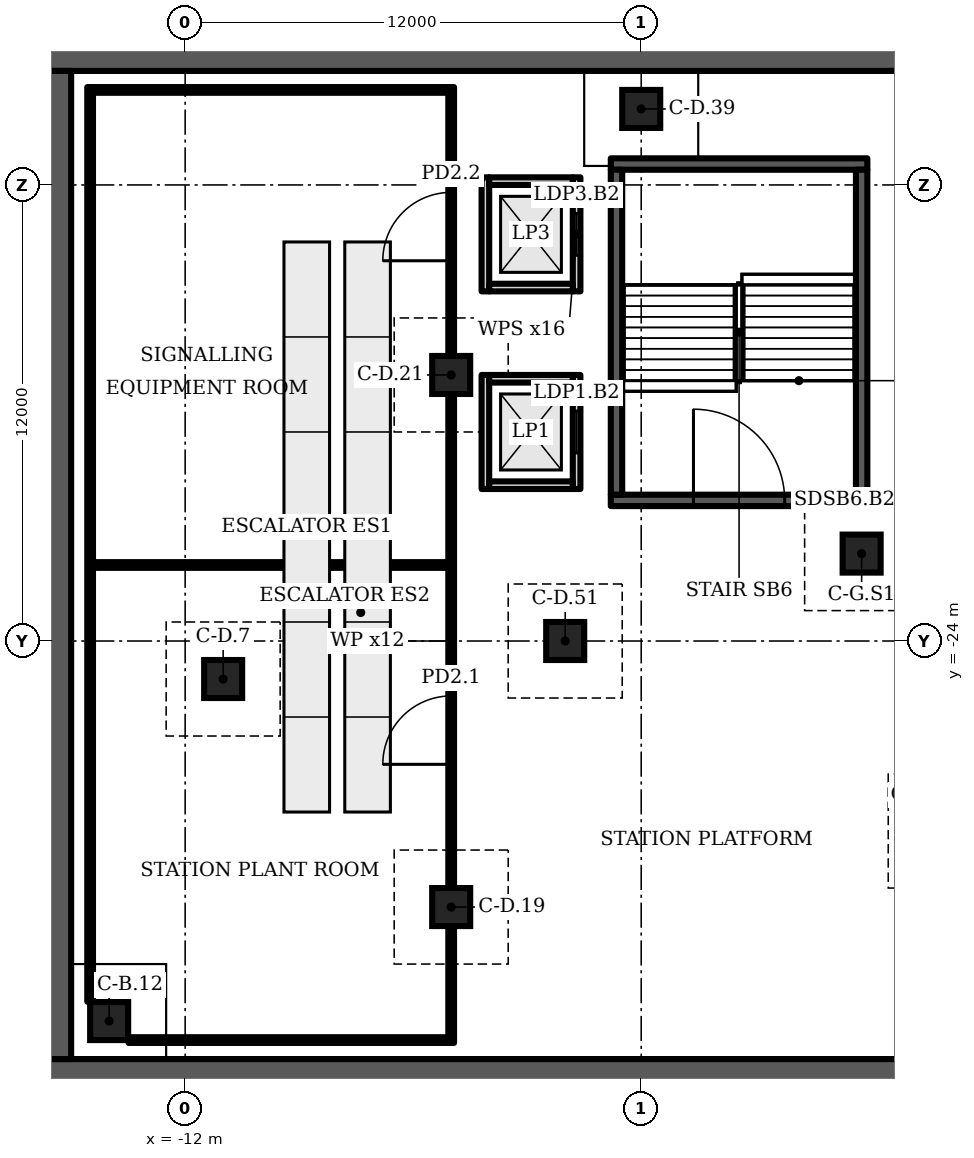
"""IFC4 building model, lengths in metres.
Left out: names, types, materials, properties, quantities, classifications, styles, units other than length and angle.
Written with IfcOpenShell. Run it as: python <this file> out.ifc"""

import sys

from ifc_helpers import new_model, si_unit, direction, frame, frame_2d, origin, origin_2d, place, context, subcontext, project, spatial, rectangle, extrude, element, fill, save


model = new_model("IFC4")
c1 = context("Model", 3, precision=1e-05, world=origin(), true_north=direction((0.0, 1.0)))
c2 = subcontext(c1, "Body", "Model", "MODEL_VIEW")
j1 = project(units=[si_unit("LENGTHUNIT", "METRE"), si_unit("PLANEANGLEUNIT", "RADIAN")], contexts=[c1])
p1 = place(None, origin())
s1 = spatial("IfcSite", under=j1, at=p1, CompositionType="ELEMENT")
p2 = place(p1, origin())
s2 = spatial("IfcBuilding", under=s1, at=p2, CompositionType="ELEMENT")
p3 = place(p2, frame((0.0, 0.0, -14.4)))
s3 = spatial("IfcBuildingStorey", under=s2, at=p3, CompositionType="ELEMENT", Elevation=-14.4)
for number, where, z_axis, x_axis in (
    (1, (-16.0, -35.5, -13.6), (0.0, 0.0, 1.0), (1.0, 0.0, 0.0)),
    (2, (-16.0, -8.5, -13.6), (0.0, 0.0, 1.0), (1.0, 0.0, 0.0)),
):
    element("IfcWall", number, at=place(p3, frame(where, z_axis=z_axis, x_axis=x_axis)), inside=s3, PredefinedType="SOLIDWALL", context=c2, shape_type="SweptSolid", body=[
        extrude(rectangle(XDim=128.0, YDim=1.0, at=frame_2d((64.0, 0.0))), origin(), (0.0, 0.0, 1.0), 20.8),
    ])
p4 = place(p3, frame((-15.5, -35.0, -13.6), z_axis=(0.0, 0.0, 1.0), x_axis=(0.0, 1.0, 0.0)))
e3 = element("IfcWall", 3, at=p4, inside=s3, PredefinedType="SOLIDWALL", context=c2, shape_type="SweptSolid", body=[
    extrude(rectangle(XDim=26.0, YDim=1.0, at=frame_2d((13.0, 0.0))), origin(), (0.0, 0.0, 1.0), 20.8),
])
for number, where, z_axis, x_axis in (
    (4, (5.8, -21.7, 0.0), (0.0, 0.0, 1.0), (1.0, 0.0, 0.0)),
    (5, (-11.0, -25.0, 0.0), (0.0, 0.0, 1.0), (1.0, 0.0, 0.0)),
    (6, (-5.0, -31.0, 0.0), (0.0, 0.0, 1.0), (1.0, 0.0, 0.0)),
    (7, (-5.0, -17.0, 0.0), (0.0, 0.0, 1.0), (1.0, 0.0, 0.0)),
    (8, (0.0, -10.0, 0.0), (0.0, 0.0, 1.0), (1.0, 0.0, 0.0)),
    (9, (-2.0, -24.0, 0.0), (0.0, 0.0, 1.0), (1.0, 0.0, 0.0)),
    (10, (-14.0, -34.0, 0.0), (0.0, 0.0, 1.0), (1.0, 0.0, 0.0)),
):
    element("IfcColumn", number, at=place(p3, frame(where, z_axis=z_axis, x_axis=x_axis)), inside=s3, PredefinedType="COLUMN", context=c2, shape_type="SweptSolid", body=[
        extrude(rectangle(XDim=1.0, YDim=1.0, at=origin_2d()), origin(), (0.0, 0.0, 1.0), 7.2),
    ])
p5 = place(p3, frame((-13.49, -34.5, 0.0), z_axis=(0.0, 0.0, 1.0), x_axis=(1.0, 0.0, 0.0)))
e11 = element("IfcWall", 11, at=p5, inside=s3, PredefinedType="PARTITIONING", context=c2, shape_type="SweptSolid", body=[
    extrude(rectangle(XDim=8.415, YDim=0.15, at=frame_2d((4.208, 0.0))), origin(), (0.0, 0.0, 1.0), 6.9),
])
p6 = place(p3, frame((-5.0, -34.575, 0.0), z_axis=(0.0, 0.0, 1.0), x_axis=(0.0, 1.0, 0.0)))
e12 = element("IfcWall", 12, at=p6, inside=s3, PredefinedType="PARTITIONING", context=c2, shape_type="SweptSolid", body=[
    extrude(rectangle(XDim=3.065, YDim=0.15, at=frame_2d((1.532, 0.0))), origin(), (0.0, 0.0, 1.0), 6.9),
])
p7 = place(p3, frame((-5.0, -30.49, 0.0), z_axis=(0.0, 0.0, 1.0), x_axis=(0.0, 1.0, 0.0)))
e13 = element("IfcWall", 13, at=p7, inside=s3, PredefinedType="PARTITIONING", context=c2, shape_type="SweptSolid", body=[
    extrude(rectangle(XDim=12.98, YDim=0.15, at=frame_2d((6.49, 0.0))), origin(), (0.0, 0.0, 1.0), 6.9),
])
p8 = place(p7, frame((3.245, 0.0, 0.0)))
e14 = element("IfcOpeningElement", 14, at=p8, cuts=e13, PredefinedType="OPENING", context=c2, shape_type="SweptSolid", body=[
    extrude(rectangle(XDim=1.8, YDim=2.1, at=frame_2d((0.9, 1.05))), frame((0.0, 0.085, 0.0), z_axis=(0.0, -1.0, 0.0), x_axis=(1.0, 0.0, 0.0)), (0.0, 0.0, 1.0), 0.17),
])
p9 = place(p3, frame((-5.0, -16.49, 0.0), z_axis=(0.0, 0.0, 1.0), x_axis=(0.0, 1.0, 0.0)))
e15 = element("IfcWall", 15, at=p9, inside=s3, PredefinedType="PARTITIONING", context=c2, shape_type="SweptSolid", body=[
    extrude(rectangle(XDim=7.065, YDim=0.15, at=frame_2d((3.532, 0.0))), origin(), (0.0, 0.0, 1.0), 6.9),
])
p10 = place(p9, frame((2.495, 0.0, 0.0)))
e16 = element("IfcOpeningElement", 16, at=p10, cuts=e15, PredefinedType="OPENING", context=c2, shape_type="SweptSolid", body=[
    extrude(rectangle(XDim=1.8, YDim=2.1, at=frame_2d((0.9, 1.05))), frame((0.0, 0.085, 0.0), z_axis=(0.0, -1.0, 0.0), x_axis=(1.0, 0.0, 0.0)), (0.0, 0.0, 1.0), 0.17),
])
p11 = place(p3, frame((-14.425, -22.0, 0.0), z_axis=(0.0, 0.0, 1.0), x_axis=(1.0, 0.0, 0.0)))
e17 = element("IfcWall", 17, at=p11, inside=s3, PredefinedType="PARTITIONING", context=c2, shape_type="SweptSolid", body=[
    extrude(rectangle(XDim=9.35, YDim=0.15, at=frame_2d((4.675, 0.0))), origin(), (0.0, 0.0, 1.0), 6.9),
])
p12 = place(p3, frame((-14.5, -33.49, 0.0), z_axis=(0.0, 0.0, 1.0), x_axis=(0.0, 1.0, 0.0)))
e18 = element("IfcWall", 18, at=p12, inside=s3, PredefinedType="PARTITIONING", context=c2, shape_type="SweptSolid", body=[
    extrude(rectangle(XDim=24.065, YDim=0.15, at=frame_2d((12.032, 0.0))), origin(), (0.0, 0.0, 1.0), 6.9),
])
p13 = place(p3, frame((-14.425, -9.5, 0.0), z_axis=(0.0, 0.0, 1.0), x_axis=(1.0, 0.0, 0.0)))
e19 = element("IfcWall", 19, at=p13, inside=s3, PredefinedType="PARTITIONING", context=c2, shape_type="SweptSolid", body=[
    extrude(rectangle(XDim=9.35, YDim=0.15, at=frame_2d((4.675, 0.0))), origin(), (0.0, 0.0, 1.0), 6.9),
])
p14 = place(p3, frame((-0.8, -20.3, 0.0), z_axis=(0.0, 0.0, 1.0), x_axis=(1.0, 0.0, 0.0)))
e20 = element("IfcWall", 20, at=p14, inside=s3, PredefinedType="SHEAR", context=c2, shape_type="SweptSolid", body=[
    extrude(rectangle(XDim=6.75, YDim=0.3, at=frame_2d((3.375, 0.0))), origin(), (0.0, 0.0, 1.0), 6.9),
])
p15 = place(p14, frame((2.175, 0.0, 0.0)))
e21 = element("IfcOpeningElement", 21, at=p15, cuts=e20, PredefinedType="OPENING", context=c2, shape_type="SweptSolid", body=[
    extrude(rectangle(XDim=2.4, YDim=2.1, at=frame_2d((1.2, 1.05))), frame((0.0, 0.16, 0.0), z_axis=(0.0, -1.0, 0.0), x_axis=(1.0, 0.0, 0.0)), (0.0, 0.0, 1.0), 0.32),
])
p16 = place(p3, frame((-0.8, -11.45, 0.0), z_axis=(0.0, 0.0, 1.0), x_axis=(1.0, 0.0, 0.0)))
e22 = element("IfcWall", 22, at=p16, inside=s3, PredefinedType="SHEAR", context=c2, shape_type="SweptSolid", body=[
    extrude(rectangle(XDim=6.75, YDim=0.3, at=frame_2d((3.375, 0.0))), origin(), (0.0, 0.0, 1.0), 6.9),
])
for number, where, z_axis, x_axis in (
    (23, (-0.65, -20.15, 0.0), (0.0, 0.0, 1.0), (0.0, 1.0, 0.0)),
    (24, (5.8, -20.15, 0.0), (0.0, 0.0, 1.0), (0.0, 1.0, 0.0)),
):
    element("IfcWall", number, at=place(p3, frame(where, z_axis=z_axis, x_axis=x_axis)), inside=s3, PredefinedType="SHEAR", context=c2, shape_type="SweptSolid", body=[
        extrude(rectangle(XDim=8.55, YDim=0.3, at=frame_2d((4.275, 0.0))), origin(), (0.0, 0.0, 1.0), 6.9),
    ])
p17 = place(p3, frame((-4.1, -20.0, 0.0), z_axis=(0.0, 0.0, 1.0), x_axis=(0.0, 1.0, 0.0)))
e25 = element("IfcWall", 25, at=p17, inside=s3, PredefinedType="PARTITIONING", context=c2, shape_type="SweptSolid", body=[
    extrude(rectangle(XDim=3.0, YDim=0.2, at=frame_2d((1.5, 0.0))), origin(), (0.0, 0.0, 1.0), 6.9),
])
p18 = place(p3, frame((-1.7, -20.0, 0.0), z_axis=(0.0, 0.0, 1.0), x_axis=(0.0, 1.0, 0.0)))
e26 = element("IfcWall", 26, at=p18, inside=s3, PredefinedType="PARTITIONING", context=c2, shape_type="SweptSolid", body=[
    extrude(rectangle(XDim=3.0, YDim=0.2, at=frame_2d((1.5, 0.0))), origin(), (0.0, 0.0, 1.0), 6.9),
])
p19 = place(p18, frame((0.95, 0.0, 0.0)))
e27 = element("IfcOpeningElement", 27, at=p19, cuts=e26, PredefinedType="OPENING", context=c2, shape_type="SweptSolid", body=[
    extrude(rectangle(XDim=1.1, YDim=2.1, at=frame_2d((0.55, 1.05))), frame((0.0, 0.11, 0.0), z_axis=(0.0, -1.0, 0.0), x_axis=(1.0, 0.0, 0.0)), (0.0, 0.0, 1.0), 0.22),
])
for number, where, z_axis, x_axis in (
    (28, (-4.0, -19.9, 0.0), (0.0, 0.0, 1.0), (1.0, 0.0, 0.0)),
    (29, (-4.0, -17.1, 0.0), (0.0, 0.0, 1.0), (1.0, 0.0, 0.0)),
):
    element("IfcWall", number, at=place(p3, frame(where, z_axis=z_axis, x_axis=x_axis)), inside=s3, PredefinedType="PARTITIONING", context=c2, shape_type="SweptSolid", body=[
        extrude(rectangle(XDim=2.2, YDim=0.2, at=frame_2d((1.1, 0.0))), origin(), (0.0, 0.0, 1.0), 6.9),
    ])
p20 = place(p3, frame((-4.1, -14.8, 0.0), z_axis=(0.0, 0.0, 1.0), x_axis=(0.0, 1.0, 0.0)))
e30 = element("IfcWall", 30, at=p20, inside=s3, PredefinedType="PARTITIONING", context=c2, shape_type="SweptSolid", body=[
    extrude(rectangle(XDim=3.0, YDim=0.2, at=frame_2d((1.5, 0.0))), origin(), (0.0, 0.0, 1.0), 6.9),
])
p21 = place(p3, frame((-1.7, -14.8, 0.0), z_axis=(0.0, 0.0, 1.0), x_axis=(0.0, 1.0, 0.0)))
e31 = element("IfcWall", 31, at=p21, inside=s3, PredefinedType="PARTITIONING", context=c2, shape_type="SweptSolid", body=[
    extrude(rectangle(XDim=3.0, YDim=0.2, at=frame_2d((1.5, 0.0))), origin(), (0.0, 0.0, 1.0), 6.9),
])
p22 = place(p21, frame((0.95, 0.0, 0.0)))
e32 = element("IfcOpeningElement", 32, at=p22, cuts=e31, PredefinedType="OPENING", context=c2, shape_type="SweptSolid", body=[
    extrude(rectangle(XDim=1.1, YDim=2.1, at=frame_2d((0.55, 1.05))), frame((0.0, 0.11, 0.0), z_axis=(0.0, -1.0, 0.0), x_axis=(1.0, 0.0, 0.0)), (0.0, 0.0, 1.0), 0.22),
])
for number, where, z_axis, x_axis in (
    (33, (-4.0, -14.7, 0.0), (0.0, 0.0, 1.0), (1.0, 0.0, 0.0)),
    (34, (-4.0, -11.9, 0.0), (0.0, 0.0, 1.0), (1.0, 0.0, 0.0)),
):
    element("IfcWall", number, at=place(p3, frame(where, z_axis=z_axis, x_axis=x_axis)), inside=s3, PredefinedType="PARTITIONING", context=c2, shape_type="SweptSolid", body=[
        extrude(rectangle(XDim=2.2, YDim=0.2, at=frame_2d((1.1, 0.0))), origin(), (0.0, 0.0, 1.0), 6.9),
    ])
p23 = place(p8, origin())
e35 = element("IfcDoor", 35, at=p23, inside=s3, OperationType="DOUBLE_DOOR_SINGLE_SWING", PredefinedType="DOOR", context=c2, shape_type="SweptSolid", body=[
    extrude(rectangle(XDim=1.8, YDim=2.1, at=frame_2d((0.9, 1.05))), frame((0.0, 0.025, 0.0), z_axis=(0.0, -1.0, 0.0), x_axis=(1.0, 0.0, 0.0)), (0.0, 0.0, 1.0), 0.05),
])
fill(e14, e35)
p24 = place(p10, origin())
e36 = element("IfcDoor", 36, at=p24, inside=s3, OperationType="DOUBLE_DOOR_SINGLE_SWING", PredefinedType="DOOR", context=c2, shape_type="SweptSolid", body=[
    extrude(rectangle(XDim=1.8, YDim=2.1, at=frame_2d((0.9, 1.05))), frame((0.0, 0.025, 0.0), z_axis=(0.0, -1.0, 0.0), x_axis=(1.0, 0.0, 0.0)), (0.0, 0.0, 1.0), 0.05),
])
fill(e16, e36)
p25 = place(p15, origin())
e37 = element("IfcDoor", 37, at=p25, inside=s3, OperationType="DOUBLE_DOOR_SINGLE_SWING", PredefinedType="DOOR", context=c2, shape_type="SweptSolid", body=[
    extrude(rectangle(XDim=2.4, YDim=2.1, at=frame_2d((1.2, 1.05))), frame((0.0, 0.025, 0.0), z_axis=(0.0, -1.0, 0.0), x_axis=(1.0, 0.0, 0.0)), (0.0, 0.0, 1.0), 0.05),
])
fill(e21, e37)
p26 = place(p19, origin())
e38 = element("IfcDoor", 38, at=p26, inside=s3, OperationType="DOUBLE_DOOR_SLIDING", PredefinedType="DOOR", context=c2, shape_type="SweptSolid", body=[
    extrude(rectangle(XDim=1.1, YDim=2.1, at=frame_2d((0.55, 1.05))), frame((0.0, 0.025, 0.0), z_axis=(0.0, -1.0, 0.0), x_axis=(1.0, 0.0, 0.0)), (0.0, 0.0, 1.0), 0.05),
])
fill(e27, e38)
p27 = place(p22, origin())
e39 = element("IfcDoor", 39, at=p27, inside=s3, OperationType="DOUBLE_DOOR_SLIDING", PredefinedType="DOOR", context=c2, shape_type="SweptSolid", body=[
    extrude(rectangle(XDim=1.1, YDim=2.1, at=frame_2d((0.55, 1.05))), frame((0.0, 0.025, 0.0), z_axis=(0.0, -1.0, 0.0), x_axis=(1.0, 0.0, 0.0)), (0.0, 0.0, 1.0), 0.05),
])
fill(e32, e39)
save(model, sys.argv[1])
